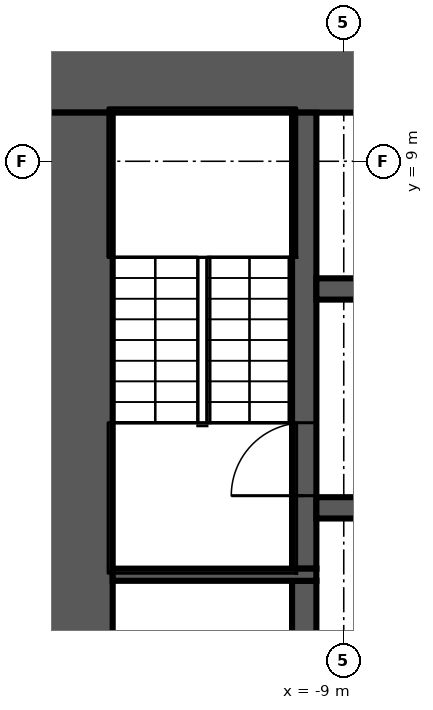
"""IFC4 building model, lengths in metres.
Left out: names, types, materials, properties, quantities, classifications, styles, units other than length and angle.
Written with IfcOpenShell. Run it as: python <this file> out.ifc"""

import sys

from ifc_helpers import new_model, si_unit, direction, frame, frame_2d, origin, place, context, subcontext, project, spatial, rectangle, extrude, element, fill, save


model = new_model("IFC4")
c1 = context("Model", 3, precision=1e-05, world=origin(), true_north=direction((0.0, 1.0)))
c2 = subcontext(c1, "Body", "Model", "MODEL_VIEW")
j1 = project(units=[si_unit("LENGTHUNIT", "METRE"), si_unit("PLANEANGLEUNIT", "RADIAN")], contexts=[c1])
p1 = place(None, origin())
s1 = spatial("IfcSite", under=j1, at=p1, CompositionType="ELEMENT")
p2 = place(p1, origin())
s2 = spatial("IfcBuilding", under=s1, at=p2, CompositionType="ELEMENT")
p3 = place(p2, frame((0.0, 0.0, -6.0)))
s3 = spatial("IfcBuildingStorey", under=s2, at=p3, CompositionType="ELEMENT", Elevation=-6.0)
p4 = place(p3, frame((-14.0, 10.4, 0.0), z_axis=(0.0, 0.0, 1.0), x_axis=(1.0, 0.0, 0.0)))
e1 = element("IfcWall", 1, at=p4, inside=s3, PredefinedType="SHEAR", context=c2, shape_type="SweptSolid", body=[
    extrude(rectangle(XDim=28.0, YDim=1.2, at=frame_2d((14.0, 0.0))), origin(), (0.0, 0.0, 1.0), 5.55),
])
p5 = place(p4, frame((15.9, 0.0, 0.0)))
e2 = element("IfcOpeningElement", 2, at=p5, cuts=e1, PredefinedType="OPENING", context=c2, shape_type="SweptSolid", body=[
    extrude(rectangle(XDim=1.6, YDim=2.1, at=frame_2d((0.8, 1.05))), frame((0.0, 0.61, 0.0), z_axis=(0.0, -1.0, 0.0), x_axis=(1.0, 0.0, 0.0)), (0.0, 0.0, 1.0), 1.22),
])
p6 = place(p3, frame((-13.4, -9.8, 0.0), z_axis=(0.0, 0.0, 1.0), x_axis=(0.0, 1.0, 0.0)))
e3 = element("IfcWall", 3, at=p6, inside=s3, PredefinedType="SHEAR", context=c2, shape_type="SweptSolid", body=[
    extrude(rectangle(XDim=19.6, YDim=1.2, at=frame_2d((9.8, 0.0))), origin(), (0.0, 0.0, 1.0), 5.55),
])
p7 = place(p3, frame((-9.65, -2.1, 0.0), z_axis=(0.0, 0.0, 1.0), x_axis=(0.0, 1.0, 0.0)))
e4 = element("IfcWall", 4, at=p7, inside=s3, PredefinedType="SHEAR", context=c2, shape_type="SweptSolid", body=[
    extrude(rectangle(XDim=4.2, YDim=0.4, at=frame_2d((2.1, 0.0))), origin(), (0.0, 0.0, 1.0), 5.55),
])
p8 = place(p3, frame((-9.65, 2.3, 0.0), z_axis=(0.0, 0.0, 1.0), x_axis=(0.0, 1.0, 0.0)))
e5 = element("IfcWall", 5, at=p8, inside=s3, PredefinedType="SHEAR", context=c2, shape_type="SweptSolid", body=[
    extrude(rectangle(XDim=7.5, YDim=0.4, at=frame_2d((3.75, 0.0))), origin(), (0.0, 0.0, 1.0), 5.55),
])
p9 = place(p8, frame((1.2, 0.0, 0.0)))
e6 = element("IfcOpeningElement", 6, at=p9, cuts=e5, PredefinedType="OPENING", context=c2, shape_type="SweptSolid", body=[
    extrude(rectangle(XDim=1.2, YDim=2.1, at=frame_2d((0.6, 1.05))), frame((0.0, 0.21, 0.0), z_axis=(0.0, -1.0, 0.0), x_axis=(1.0, 0.0, 0.0)), (0.0, 0.0, 1.0), 0.42),
])
p10 = place(p3, frame((-9.45, 2.2, 0.0), z_axis=(0.0, 0.0, 1.0), x_axis=(-1.0, 0.0, 0.0)))
e7 = element("IfcWall", 7, at=p10, inside=s3, PredefinedType="SHEAR", context=c2, shape_type="SweptSolid", body=[
    extrude(rectangle(XDim=3.35, YDim=0.2, at=frame_2d((1.675, 0.0))), origin(), (0.0, 0.0, 1.0), 5.55),
])
p11 = place(p3, frame((-9.45, 6.9, 0.0), z_axis=(0.0, 0.0, 1.0), x_axis=(1.0, 0.0, 0.0)))
e8 = element("IfcWall", 8, at=p11, inside=s3, PredefinedType="SHEAR", context=c2, shape_type="SweptSolid", body=[
    extrude(rectangle(XDim=18.9, YDim=0.35, at=frame_2d((9.45, 0.0))), origin(), (0.0, 0.0, 1.0), 5.55),
])
p12 = place(p11, frame((0.8, 0.0, 0.0)))
e9 = element("IfcOpeningElement", 9, at=p12, cuts=e8, PredefinedType="OPENING", context=c2, shape_type="SweptSolid", body=[
    extrude(rectangle(XDim=1.1, YDim=2.1, at=frame_2d((0.55, 1.05))), frame((0.0, 0.185, 0.0), z_axis=(0.0, -1.0, 0.0), x_axis=(1.0, 0.0, 0.0)), (0.0, 0.0, 1.0), 0.37),
])
p13 = place(p11, frame((3.5, 0.0, 0.0)))
e10 = element("IfcOpeningElement", 10, at=p13, cuts=e8, PredefinedType="OPENING", context=c2, shape_type="SweptSolid", body=[
    extrude(rectangle(XDim=1.1, YDim=2.1, at=frame_2d((0.55, 1.05))), frame((0.0, 0.185, 0.0), z_axis=(0.0, -1.0, 0.0), x_axis=(1.0, 0.0, 0.0)), (0.0, 0.0, 1.0), 0.37),
])
p14 = place(p11, frame((6.2, 0.0, 0.0)))
e11 = element("IfcOpeningElement", 11, at=p14, cuts=e8, PredefinedType="OPENING", context=c2, shape_type="SweptSolid", body=[
    extrude(rectangle(XDim=1.1, YDim=2.1, at=frame_2d((0.55, 1.05))), frame((0.0, 0.185, 0.0), z_axis=(0.0, -1.0, 0.0), x_axis=(1.0, 0.0, 0.0)), (0.0, 0.0, 1.0), 0.37),
])
p15 = place(p11, frame((8.9, 0.0, 0.0)))
e12 = element("IfcOpeningElement", 12, at=p15, cuts=e8, PredefinedType="OPENING", context=c2, shape_type="SweptSolid", body=[
    extrude(rectangle(XDim=1.1, YDim=2.1, at=frame_2d((0.55, 1.05))), frame((0.0, 0.185, 0.0), z_axis=(0.0, -1.0, 0.0), x_axis=(1.0, 0.0, 0.0)), (0.0, 0.0, 1.0), 0.37),
])
p16 = place(p11, frame((11.55, 0.0, 0.0)))
e13 = element("IfcOpeningElement", 13, at=p16, cuts=e8, PredefinedType="OPENING", context=c2, shape_type="SweptSolid", body=[
    extrude(rectangle(XDim=1.2, YDim=2.1, at=frame_2d((0.6, 1.05))), frame((0.0, 0.185, 0.0), z_axis=(0.0, -1.0, 0.0), x_axis=(1.0, 0.0, 0.0)), (0.0, 0.0, 1.0), 0.37),
])
p17 = place(p11, frame((14.3, 0.0, 0.0)))
e14 = element("IfcOpeningElement", 14, at=p17, cuts=e8, PredefinedType="OPENING", context=c2, shape_type="SweptSolid", body=[
    extrude(rectangle(XDim=1.1, YDim=2.1, at=frame_2d((0.55, 1.05))), frame((0.0, 0.185, 0.0), z_axis=(0.0, -1.0, 0.0), x_axis=(1.0, 0.0, 0.0)), (0.0, 0.0, 1.0), 0.37),
])
p18 = place(p11, frame((17.0, 0.0, 0.0)))
e15 = element("IfcOpeningElement", 15, at=p18, cuts=e8, PredefinedType="OPENING", context=c2, shape_type="SweptSolid", body=[
    extrude(rectangle(XDim=1.1, YDim=2.1, at=frame_2d((0.55, 1.05))), frame((0.0, 0.185, 0.0), z_axis=(0.0, -1.0, 0.0), x_axis=(1.0, 0.0, 0.0)), (0.0, 0.0, 1.0), 0.37),
])
p19 = place(p3, frame((9.45, 3.3, 0.0), z_axis=(0.0, 0.0, 1.0), x_axis=(-1.0, 0.0, 0.0)))
e16 = element("IfcWall", 16, at=p19, inside=s3, PredefinedType="SHEAR", context=c2, shape_type="SweptSolid", body=[
    extrude(rectangle(XDim=18.9, YDim=0.35, at=frame_2d((9.45, 0.0))), origin(), (0.0, 0.0, 1.0), 5.55),
])
p20 = place(p19, frame((17.0, 0.0, 0.0)))
e17 = element("IfcOpeningElement", 17, at=p20, cuts=e16, PredefinedType="OPENING", context=c2, shape_type="SweptSolid", body=[
    extrude(rectangle(XDim=1.1, YDim=2.1, at=frame_2d((0.55, 1.05))), frame((0.0, 0.185, 0.0), z_axis=(0.0, -1.0, 0.0), x_axis=(1.0, 0.0, 0.0)), (0.0, 0.0, 1.0), 0.37),
])
p21 = place(p19, frame((14.3, 0.0, 0.0)))
e18 = element("IfcOpeningElement", 18, at=p21, cuts=e16, PredefinedType="OPENING", context=c2, shape_type="SweptSolid", body=[
    extrude(rectangle(XDim=1.1, YDim=2.1, at=frame_2d((0.55, 1.05))), frame((0.0, 0.185, 0.0), z_axis=(0.0, -1.0, 0.0), x_axis=(1.0, 0.0, 0.0)), (0.0, 0.0, 1.0), 0.37),
])
p22 = place(p19, frame((11.6, 0.0, 0.0)))
e19 = element("IfcOpeningElement", 19, at=p22, cuts=e16, PredefinedType="OPENING", context=c2, shape_type="SweptSolid", body=[
    extrude(rectangle(XDim=1.1, YDim=2.1, at=frame_2d((0.55, 1.05))), frame((0.0, 0.185, 0.0), z_axis=(0.0, -1.0, 0.0), x_axis=(1.0, 0.0, 0.0)), (0.0, 0.0, 1.0), 0.37),
])
p23 = place(p19, frame((8.9, 0.0, 0.0)))
e20 = element("IfcOpeningElement", 20, at=p23, cuts=e16, PredefinedType="OPENING", context=c2, shape_type="SweptSolid", body=[
    extrude(rectangle(XDim=1.1, YDim=2.1, at=frame_2d((0.55, 1.05))), frame((0.0, 0.185, 0.0), z_axis=(0.0, -1.0, 0.0), x_axis=(1.0, 0.0, 0.0)), (0.0, 0.0, 1.0), 0.37),
])
p24 = place(p19, frame((6.2, 0.0, 0.0)))
e21 = element("IfcOpeningElement", 21, at=p24, cuts=e16, PredefinedType="OPENING", context=c2, shape_type="SweptSolid", body=[
    extrude(rectangle(XDim=1.1, YDim=2.1, at=frame_2d((0.55, 1.05))), frame((0.0, 0.185, 0.0), z_axis=(0.0, -1.0, 0.0), x_axis=(1.0, 0.0, 0.0)), (0.0, 0.0, 1.0), 0.37),
])
p25 = place(p19, frame((3.5, 0.0, 0.0)))
e22 = element("IfcOpeningElement", 22, at=p25, cuts=e16, PredefinedType="OPENING", context=c2, shape_type="SweptSolid", body=[
    extrude(rectangle(XDim=1.1, YDim=2.1, at=frame_2d((0.55, 1.05))), frame((0.0, 0.185, 0.0), z_axis=(0.0, -1.0, 0.0), x_axis=(1.0, 0.0, 0.0)), (0.0, 0.0, 1.0), 0.37),
])
p26 = place(p19, frame((0.9, 0.0, 0.0)))
e23 = element("IfcOpeningElement", 23, at=p26, cuts=e16, PredefinedType="OPENING", context=c2, shape_type="SweptSolid", body=[
    extrude(rectangle(XDim=0.9, YDim=2.1, at=frame_2d((0.45, 1.05))), frame((0.0, 0.185, 0.0), z_axis=(0.0, -1.0, 0.0), x_axis=(1.0, 0.0, 0.0)), (0.0, 0.0, 1.0), 0.37),
])
p27 = place(p9, origin())
e24 = element("IfcDoor", 24, at=p27, inside=s3, OperationType="SINGLE_SWING_RIGHT", PredefinedType="DOOR", context=c2, shape_type="SweptSolid", body=[
    extrude(rectangle(XDim=1.2, YDim=2.1, at=frame_2d((0.6, 1.05))), frame((0.0, 0.025, 0.0), z_axis=(0.0, -1.0, 0.0), x_axis=(1.0, 0.0, 0.0)), (0.0, 0.0, 1.0), 0.05),
])
fill(e6, e24)
save(model, sys.argv[1])
